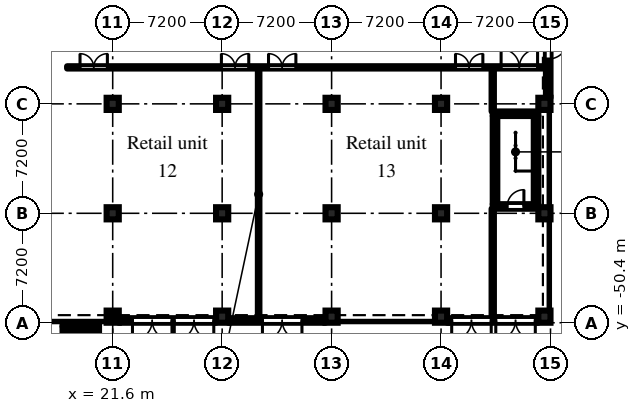
"""IFC4 building model, lengths in metres.
Left out: names, types, materials, properties, quantities, classifications, styles, units other than length and angle.
Written with IfcOpenShell. Run it as: python <this file> out.ifc"""

import sys

from ifc_helpers import new_model, si_unit, direction, frame, frame_2d, origin, origin_2d, place, context, subcontext, project, spatial, rectangle, extrude, element, fill, save


model = new_model("IFC4")
c1 = context("Model", 3, precision=1e-05, world=origin(), true_north=direction((0.0, 1.0)))
c2 = subcontext(c1, "Body", "Model", "MODEL_VIEW")
j1 = project(units=[si_unit("LENGTHUNIT", "METRE"), si_unit("PLANEANGLEUNIT", "RADIAN")], contexts=[c1])
p1 = place(None, origin())
s1 = spatial("IfcSite", under=j1, at=p1, CompositionType="ELEMENT")
p2 = place(p1, origin())
s2 = spatial("IfcBuilding", under=s1, at=p2, CompositionType="ELEMENT")
p3 = place(p2, origin())
s3 = spatial("IfcBuildingStorey", under=s2, at=p3, CompositionType="ELEMENT", Elevation=0.0)
for number, where, z_axis, x_axis in (
    (1, (21.6, -50.0, 0.0), (0.0, 0.0, 1.0), (1.0, 0.0, 0.0)),
    (2, (21.6, -43.2, 0.0), (0.0, 0.0, 1.0), (1.0, 0.0, 0.0)),
    (3, (21.6, -36.0, 0.0), (0.0, 0.0, 1.0), (1.0, 0.0, 0.0)),
    (4, (28.8, -50.0, 0.0), (0.0, 0.0, 1.0), (1.0, 0.0, 0.0)),
    (5, (28.8, -43.2, 0.0), (0.0, 0.0, 1.0), (1.0, 0.0, 0.0)),
    (6, (28.8, -36.0, 0.0), (0.0, 0.0, 1.0), (1.0, 0.0, 0.0)),
    (7, (36.0, -50.0, 0.0), (0.0, 0.0, 1.0), (1.0, 0.0, 0.0)),
    (8, (36.0, -43.2, 0.0), (0.0, 0.0, 1.0), (1.0, 0.0, 0.0)),
    (9, (36.0, -36.0, 0.0), (0.0, 0.0, 1.0), (1.0, 0.0, 0.0)),
    (10, (43.2, -50.0, 0.0), (0.0, 0.0, 1.0), (1.0, 0.0, 0.0)),
    (11, (43.2, -43.2, 0.0), (0.0, 0.0, 1.0), (1.0, 0.0, 0.0)),
    (12, (43.2, -36.0, 0.0), (0.0, 0.0, 1.0), (1.0, 0.0, 0.0)),
    (13, (50.0, -50.0, 0.0), (0.0, 0.0, 1.0), (1.0, 0.0, 0.0)),
    (14, (50.0, -43.2, 0.0), (0.0, 0.0, 1.0), (1.0, 0.0, 0.0)),
    (15, (50.0, -36.0, 0.0), (0.0, 0.0, 1.0), (1.0, 0.0, 0.0)),
):
    element("IfcColumn", number, at=place(p3, frame(where, z_axis=z_axis, x_axis=x_axis)), inside=s3, PredefinedType="COLUMN", context=c2, shape_type="SweptSolid", body=[
        extrude(rectangle(XDim=0.8, YDim=0.8, at=origin_2d()), origin(), (0.0, 0.0, 1.0), 6.6),
    ])
p4 = place(p3, frame((22.0, -50.25, 0.0), z_axis=(0.0, 0.0, 1.0), x_axis=(1.0, 0.0, 0.0)))
e16 = element("IfcWall", 16, at=p4, inside=s3, PredefinedType="SOLIDWALL", context=c2, shape_type="SweptSolid", body=[
    extrude(rectangle(XDim=6.4, YDim=0.3, at=frame_2d((3.2, 0.0))), origin(), (0.0, 0.0, 1.0), 6.6),
])
p5 = place(p4, frame((0.9, 0.0, 0.0)))
e17 = element("IfcOpeningElement", 17, at=p5, cuts=e16, PredefinedType="OPENING", context=c2, shape_type="SweptSolid", body=[
    extrude(rectangle(XDim=2.6, YDim=2.4, at=frame_2d((1.3, 1.2))), frame((0.0, 0.16, 0.0), z_axis=(0.0, -1.0, 0.0), x_axis=(1.0, 0.0, 0.0)), (0.0, 0.0, 1.0), 0.32),
])
p6 = place(p4, frame((3.65, 0.0, 0.0)))
e18 = element("IfcOpeningElement", 18, at=p6, cuts=e16, PredefinedType="OPENING", context=c2, shape_type="SweptSolid", body=[
    extrude(rectangle(XDim=2.6, YDim=2.4, at=frame_2d((1.3, 1.2))), frame((0.0, 0.16, 0.0), z_axis=(0.0, -1.0, 0.0), x_axis=(1.0, 0.0, 0.0)), (0.0, 0.0, 1.0), 0.32),
])
p7 = place(p3, frame((29.2, -50.25, 0.0), z_axis=(0.0, 0.0, 1.0), x_axis=(1.0, 0.0, 0.0)))
e19 = element("IfcWall", 19, at=p7, inside=s3, PredefinedType="SOLIDWALL", context=c2, shape_type="SweptSolid", body=[
    extrude(rectangle(XDim=6.4, YDim=0.3, at=frame_2d((3.2, 0.0))), origin(), (0.0, 0.0, 1.0), 6.6),
])
p8 = place(p7, frame((2.25, 0.0, 0.0)))
e20 = element("IfcOpeningElement", 20, at=p8, cuts=e19, PredefinedType="OPENING", context=c2, shape_type="SweptSolid", body=[
    extrude(rectangle(XDim=2.6, YDim=2.4, at=frame_2d((1.3, 1.2))), frame((0.0, 0.16, 0.0), z_axis=(0.0, -1.0, 0.0), x_axis=(1.0, 0.0, 0.0)), (0.0, 0.0, 1.0), 0.32),
])
p9 = place(p3, frame((43.6, -50.25, 0.0), z_axis=(0.0, 0.0, 1.0), x_axis=(1.0, 0.0, 0.0)))
e21 = element("IfcWall", 21, at=p9, inside=s3, PredefinedType="SOLIDWALL", context=c2, shape_type="SweptSolid", body=[
    extrude(rectangle(XDim=6.0, YDim=0.3, at=frame_2d((3.0, 0.0))), origin(), (0.0, 0.0, 1.0), 6.6),
])
p10 = place(p9, frame((0.3, 0.0, 0.0)))
e22 = element("IfcOpeningElement", 22, at=p10, cuts=e21, PredefinedType="OPENING", context=c2, shape_type="SweptSolid", body=[
    extrude(rectangle(XDim=2.6, YDim=2.4, at=frame_2d((1.3, 1.2))), frame((0.0, 0.16, 0.0), z_axis=(0.0, -1.0, 0.0), x_axis=(1.0, 0.0, 0.0)), (0.0, 0.0, 1.0), 0.32),
])
p11 = place(p9, frame((3.2, 0.0, 0.0)))
e23 = element("IfcOpeningElement", 23, at=p11, cuts=e21, PredefinedType="OPENING", context=c2, shape_type="SweptSolid", body=[
    extrude(rectangle(XDim=2.6, YDim=2.4, at=frame_2d((1.3, 1.2))), frame((0.0, 0.16, 0.0), z_axis=(0.0, -1.0, 0.0), x_axis=(1.0, 0.0, 0.0)), (0.0, 0.0, 1.0), 0.32),
])
p12 = place(p3, frame((50.25, -35.6, 0.0), z_axis=(0.0, 0.0, 1.0), x_axis=(0.0, 1.0, 0.0)))
e24 = element("IfcWall", 24, at=p12, inside=s3, PredefinedType="SOLIDWALL", context=c2, shape_type="SweptSolid", body=[
    extrude(rectangle(XDim=6.4, YDim=0.3, at=frame_2d((3.2, 0.0))), origin(), (0.0, 0.0, 1.0), 6.6),
])
p13 = place(p12, frame((2.55, 0.0, 0.0)))
e25 = element("IfcOpeningElement", 25, at=p13, cuts=e24, PredefinedType="OPENING", context=c2, shape_type="SweptSolid", body=[
    extrude(rectangle(XDim=1.3, YDim=2.1, at=frame_2d((0.65, 1.05))), frame((0.0, 0.16, 0.0), z_axis=(0.0, -1.0, 0.0), x_axis=(1.0, 0.0, 0.0)), (0.0, 0.0, 1.0), 0.32),
])
p14 = place(p3, frame((18.3, -50.525, -1.4), z_axis=(0.0, 0.0, 1.0), x_axis=(1.0, 0.0, 0.0)))
e26 = element("IfcWall", 26, at=p14, inside=s3, PredefinedType="SOLIDWALL", context=c2, shape_type="SweptSolid", body=[
    extrude(rectangle(XDim=2.4, YDim=0.25, at=frame_2d((1.2, 0.0))), origin(), (0.0, 0.0, 1.0), 8.6),
])
for number, where, z_axis, x_axis in (
    (27, (18.425, -53.15, -1.4), (0.0, 0.0, 1.0), (0.0, 1.0, 0.0)),
    (28, (20.575, -53.15, -1.4), (0.0, 0.0, 1.0), (0.0, 1.0, 0.0)),
):
    element("IfcWall", number, at=place(p3, frame(where, z_axis=z_axis, x_axis=x_axis)), inside=s3, PredefinedType="SOLIDWALL", context=c2, shape_type="SweptSolid", body=[
        extrude(rectangle(XDim=2.5, YDim=0.25, at=frame_2d((1.25, 0.0))), origin(), (0.0, 0.0, 1.0), 8.6),
    ])
p15 = place(p3, frame((46.6, -36.65, 0.0), z_axis=(0.0, 0.0, 1.0), x_axis=(1.0, 0.0, 0.0)))
e29 = element("IfcWall", 29, at=p15, inside=s3, PredefinedType="SHEAR", context=c2, shape_type="SweptSolid", body=[
    extrude(rectangle(XDim=3.0, YDim=0.3, at=frame_2d((1.5, 0.0))), origin(), (0.0, 0.0, 1.0), 6.6),
])
p16 = place(p3, frame((46.6, -42.75, 0.0), z_axis=(0.0, 0.0, 1.0), x_axis=(1.0, 0.0, 0.0)))
e30 = element("IfcWall", 30, at=p16, inside=s3, PredefinedType="SHEAR", context=c2, shape_type="SweptSolid", body=[
    extrude(rectangle(XDim=3.0, YDim=0.3, at=frame_2d((1.5, 0.0))), origin(), (0.0, 0.0, 1.0), 6.6),
])
p17 = place(p16, frame((0.95, 0.0, 0.0)))
e31 = element("IfcOpeningElement", 31, at=p17, cuts=e30, PredefinedType="OPENING", context=c2, shape_type="SweptSolid", body=[
    extrude(rectangle(XDim=1.1, YDim=2.1, at=frame_2d((0.55, 1.05))), frame((0.0, 0.16, 0.0), z_axis=(0.0, -1.0, 0.0), x_axis=(1.0, 0.0, 0.0)), (0.0, 0.0, 1.0), 0.32),
])
for number, where, z_axis, x_axis in (
    (32, (46.75, -36.8, 0.0), (0.0, 0.0, 1.0), (0.0, -1.0, 0.0)),
    (33, (49.45, -36.8, 0.0), (0.0, 0.0, 1.0), (0.0, -1.0, 0.0)),
):
    element("IfcWall", number, at=place(p3, frame(where, z_axis=z_axis, x_axis=x_axis)), inside=s3, PredefinedType="SHEAR", context=c2, shape_type="SweptSolid", body=[
        extrude(rectangle(XDim=5.8, YDim=0.3, at=frame_2d((2.9, 0.0))), origin(), (0.0, 0.0, 1.0), 6.6),
    ])
p18 = place(p3, frame((18.6, -33.6, 0.0), z_axis=(0.0, 0.0, 1.0), x_axis=(1.0, 0.0, 0.0)))
e34 = element("IfcWall", 34, at=p18, inside=s3, PredefinedType="PARTITIONING", context=c2, shape_type="SweptSolid", body=[
    extrude(rectangle(XDim=31.62, YDim=0.15, at=frame_2d((15.81, 0.0))), origin(), (0.0, 0.0, 1.0), 6.6),
])
p19 = place(p18, frame((28.55, 0.0, 0.0)))
e35 = element("IfcOpeningElement", 35, at=p19, cuts=e34, PredefinedType="OPENING", context=c2, shape_type="SweptSolid", body=[
    extrude(rectangle(XDim=2.4, YDim=2.1, at=frame_2d((1.2, 1.05))), frame((0.0, 0.085, 0.0), z_axis=(0.0, -1.0, 0.0), x_axis=(1.0, 0.0, 0.0)), (0.0, 0.0, 1.0), 0.17),
])
p20 = place(p18, frame((0.85, 0.0, 0.0)))
e36 = element("IfcOpeningElement", 36, at=p20, cuts=e34, PredefinedType="OPENING", context=c2, shape_type="SweptSolid", body=[
    extrude(rectangle(XDim=1.8, YDim=2.1, at=frame_2d((0.9, 1.05))), frame((0.0, 0.085, 0.0), z_axis=(0.0, -1.0, 0.0), x_axis=(1.0, 0.0, 0.0)), (0.0, 0.0, 1.0), 0.17),
])
p21 = place(p18, frame((10.15, 0.0, 0.0)))
e37 = element("IfcOpeningElement", 37, at=p21, cuts=e34, PredefinedType="OPENING", context=c2, shape_type="SweptSolid", body=[
    extrude(rectangle(XDim=1.8, YDim=2.1, at=frame_2d((0.9, 1.05))), frame((0.0, 0.085, 0.0), z_axis=(0.0, -1.0, 0.0), x_axis=(1.0, 0.0, 0.0)), (0.0, 0.0, 1.0), 0.17),
])
p22 = place(p18, frame((13.25, 0.0, 0.0)))
e38 = element("IfcOpeningElement", 38, at=p22, cuts=e34, PredefinedType="OPENING", context=c2, shape_type="SweptSolid", body=[
    extrude(rectangle(XDim=1.8, YDim=2.1, at=frame_2d((0.9, 1.05))), frame((0.0, 0.085, 0.0), z_axis=(0.0, -1.0, 0.0), x_axis=(1.0, 0.0, 0.0)), (0.0, 0.0, 1.0), 0.17),
])
p23 = place(p18, frame((25.55, 0.0, 0.0)))
e39 = element("IfcOpeningElement", 39, at=p23, cuts=e34, PredefinedType="OPENING", context=c2, shape_type="SweptSolid", body=[
    extrude(rectangle(XDim=1.8, YDim=2.1, at=frame_2d((0.9, 1.05))), frame((0.0, 0.085, 0.0), z_axis=(0.0, -1.0, 0.0), x_axis=(1.0, 0.0, 0.0)), (0.0, 0.0, 1.0), 0.17),
])
p24 = place(p3, frame((31.2, -50.22, 0.0), z_axis=(0.0, 0.0, 1.0), x_axis=(0.0, 1.0, 0.0)))
e40 = element("IfcWall", 40, at=p24, inside=s3, PredefinedType="PARTITIONING", context=c2, shape_type="SweptSolid", body=[
    extrude(rectangle(XDim=16.545, YDim=0.1, at=frame_2d((8.272, 0.0))), origin(), (0.0, 0.0, 1.0), 6.6),
])
p25 = place(p3, frame((46.6, -50.22, 0.0), z_axis=(0.0, 0.0, 1.0), x_axis=(0.0, 1.0, 0.0)))
e41 = element("IfcWall", 41, at=p25, inside=s3, PredefinedType="PARTITIONING", context=c2, shape_type="SweptSolid", body=[
    extrude(rectangle(XDim=7.32, YDim=0.15, at=frame_2d((3.66, 0.0))), origin(), (0.0, 0.0, 1.0), 6.6),
])
p26 = place(p3, frame((46.6, -36.5, 0.0), z_axis=(0.0, 0.0, 1.0), x_axis=(0.0, 1.0, 0.0)))
e42 = element("IfcWall", 42, at=p26, inside=s3, PredefinedType="PARTITIONING", context=c2, shape_type="SweptSolid", body=[
    extrude(rectangle(XDim=2.825, YDim=0.15, at=frame_2d((1.413, 0.0))), origin(), (0.0, 0.0, 1.0), 6.6),
])
p27 = place(p5, frame((2.6, 0.0, 0.0), z_axis=(0.0, 0.0, 1.0), x_axis=(-1.0, 0.0, 0.0)))
e43 = element("IfcDoor", 43, at=p27, inside=s3, OperationType="DOUBLE_DOOR_DOUBLE_SWING", PredefinedType="DOOR", context=c2, shape_type="SweptSolid", body=[
    extrude(rectangle(XDim=2.6, YDim=2.4, at=frame_2d((1.3, 1.2))), frame((0.0, 0.025, 0.0), z_axis=(0.0, -1.0, 0.0), x_axis=(1.0, 0.0, 0.0)), (0.0, 0.0, 1.0), 0.05),
])
fill(e17, e43)
p28 = place(p6, frame((2.6, 0.0, 0.0), z_axis=(0.0, 0.0, 1.0), x_axis=(-1.0, 0.0, 0.0)))
e44 = element("IfcDoor", 44, at=p28, inside=s3, OperationType="DOUBLE_DOOR_DOUBLE_SWING", PredefinedType="DOOR", context=c2, shape_type="SweptSolid", body=[
    extrude(rectangle(XDim=2.6, YDim=2.4, at=frame_2d((1.3, 1.2))), frame((0.0, 0.025, 0.0), z_axis=(0.0, -1.0, 0.0), x_axis=(1.0, 0.0, 0.0)), (0.0, 0.0, 1.0), 0.05),
])
fill(e18, e44)
p29 = place(p8, frame((2.6, 0.0, 0.0), z_axis=(0.0, 0.0, 1.0), x_axis=(-1.0, 0.0, 0.0)))
e45 = element("IfcDoor", 45, at=p29, inside=s3, OperationType="DOUBLE_DOOR_DOUBLE_SWING", PredefinedType="DOOR", context=c2, shape_type="SweptSolid", body=[
    extrude(rectangle(XDim=2.6, YDim=2.4, at=frame_2d((1.3, 1.2))), frame((0.0, 0.025, 0.0), z_axis=(0.0, -1.0, 0.0), x_axis=(1.0, 0.0, 0.0)), (0.0, 0.0, 1.0), 0.05),
])
fill(e20, e45)
p30 = place(p10, frame((2.6, 0.0, 0.0), z_axis=(0.0, 0.0, 1.0), x_axis=(-1.0, 0.0, 0.0)))
e46 = element("IfcDoor", 46, at=p30, inside=s3, OperationType="DOUBLE_DOOR_DOUBLE_SWING", PredefinedType="DOOR", context=c2, shape_type="SweptSolid", body=[
    extrude(rectangle(XDim=2.6, YDim=2.4, at=frame_2d((1.3, 1.2))), frame((0.0, 0.025, 0.0), z_axis=(0.0, -1.0, 0.0), x_axis=(1.0, 0.0, 0.0)), (0.0, 0.0, 1.0), 0.05),
])
fill(e22, e46)
p31 = place(p11, frame((2.6, 0.0, 0.0), z_axis=(0.0, 0.0, 1.0), x_axis=(-1.0, 0.0, 0.0)))
e47 = element("IfcDoor", 47, at=p31, inside=s3, OperationType="DOUBLE_DOOR_DOUBLE_SWING", PredefinedType="DOOR", context=c2, shape_type="SweptSolid", body=[
    extrude(rectangle(XDim=2.6, YDim=2.4, at=frame_2d((1.3, 1.2))), frame((0.0, 0.025, 0.0), z_axis=(0.0, -1.0, 0.0), x_axis=(1.0, 0.0, 0.0)), (0.0, 0.0, 1.0), 0.05),
])
fill(e23, e47)
p32 = place(p13, frame((1.3, 0.0, 0.0), z_axis=(0.0, 0.0, 1.0), x_axis=(-1.0, 0.0, 0.0)))
e48 = element("IfcDoor", 48, at=p32, inside=s3, OperationType="SINGLE_SWING_LEFT", PredefinedType="DOOR", context=c2, shape_type="SweptSolid", body=[
    extrude(rectangle(XDim=1.3, YDim=2.1, at=frame_2d((0.65, 1.05))), frame((0.0, 0.025, 0.0), z_axis=(0.0, -1.0, 0.0), x_axis=(1.0, 0.0, 0.0)), (0.0, 0.0, 1.0), 0.05),
])
fill(e25, e48)
p33 = place(p17, origin())
e49 = element("IfcDoor", 49, at=p33, inside=s3, OperationType="SINGLE_SWING_RIGHT", PredefinedType="DOOR", context=c2, shape_type="SweptSolid", body=[
    extrude(rectangle(XDim=1.1, YDim=2.1, at=frame_2d((0.55, 1.05))), frame((0.0, 0.025, 0.0), z_axis=(0.0, -1.0, 0.0), x_axis=(1.0, 0.0, 0.0)), (0.0, 0.0, 1.0), 0.05),
])
fill(e31, e49)
p34 = place(p19, origin())
e50 = element("IfcDoor", 50, at=p34, inside=s3, OperationType="DOUBLE_DOOR_DOUBLE_SWING", PredefinedType="DOOR", context=c2, shape_type="SweptSolid", body=[
    extrude(rectangle(XDim=2.4, YDim=2.1, at=frame_2d((1.2, 1.05))), frame((0.0, 0.025, 0.0), z_axis=(0.0, -1.0, 0.0), x_axis=(1.0, 0.0, 0.0)), (0.0, 0.0, 1.0), 0.05),
])
fill(e35, e50)
p35 = place(p20, origin())
e51 = element("IfcDoor", 51, at=p35, inside=s3, OperationType="DOUBLE_DOOR_DOUBLE_SWING", PredefinedType="DOOR", context=c2, shape_type="SweptSolid", body=[
    extrude(rectangle(XDim=1.8, YDim=2.1, at=frame_2d((0.9, 1.05))), frame((0.0, 0.025, 0.0), z_axis=(0.0, -1.0, 0.0), x_axis=(1.0, 0.0, 0.0)), (0.0, 0.0, 1.0), 0.05),
])
fill(e36, e51)
p36 = place(p21, origin())
e52 = element("IfcDoor", 52, at=p36, inside=s3, OperationType="DOUBLE_DOOR_DOUBLE_SWING", PredefinedType="DOOR", context=c2, shape_type="SweptSolid", body=[
    extrude(rectangle(XDim=1.8, YDim=2.1, at=frame_2d((0.9, 1.05))), frame((0.0, 0.025, 0.0), z_axis=(0.0, -1.0, 0.0), x_axis=(1.0, 0.0, 0.0)), (0.0, 0.0, 1.0), 0.05),
])
fill(e37, e52)
p37 = place(p22, origin())
e53 = element("IfcDoor", 53, at=p37, inside=s3, OperationType="DOUBLE_DOOR_DOUBLE_SWING", PredefinedType="DOOR", context=c2, shape_type="SweptSolid", body=[
    extrude(rectangle(XDim=1.8, YDim=2.1, at=frame_2d((0.9, 1.05))), frame((0.0, 0.025, 0.0), z_axis=(0.0, -1.0, 0.0), x_axis=(1.0, 0.0, 0.0)), (0.0, 0.0, 1.0), 0.05),
])
fill(e38, e53)
p38 = place(p23, origin())
e54 = element("IfcDoor", 54, at=p38, inside=s3, OperationType="DOUBLE_DOOR_DOUBLE_SWING", PredefinedType="DOOR", context=c2, shape_type="SweptSolid", body=[
    extrude(rectangle(XDim=1.8, YDim=2.1, at=frame_2d((0.9, 1.05))), frame((0.0, 0.025, 0.0), z_axis=(0.0, -1.0, 0.0), x_axis=(1.0, 0.0, 0.0)), (0.0, 0.0, 1.0), 0.05),
])
fill(e39, e54)
save(model, sys.argv[1])
